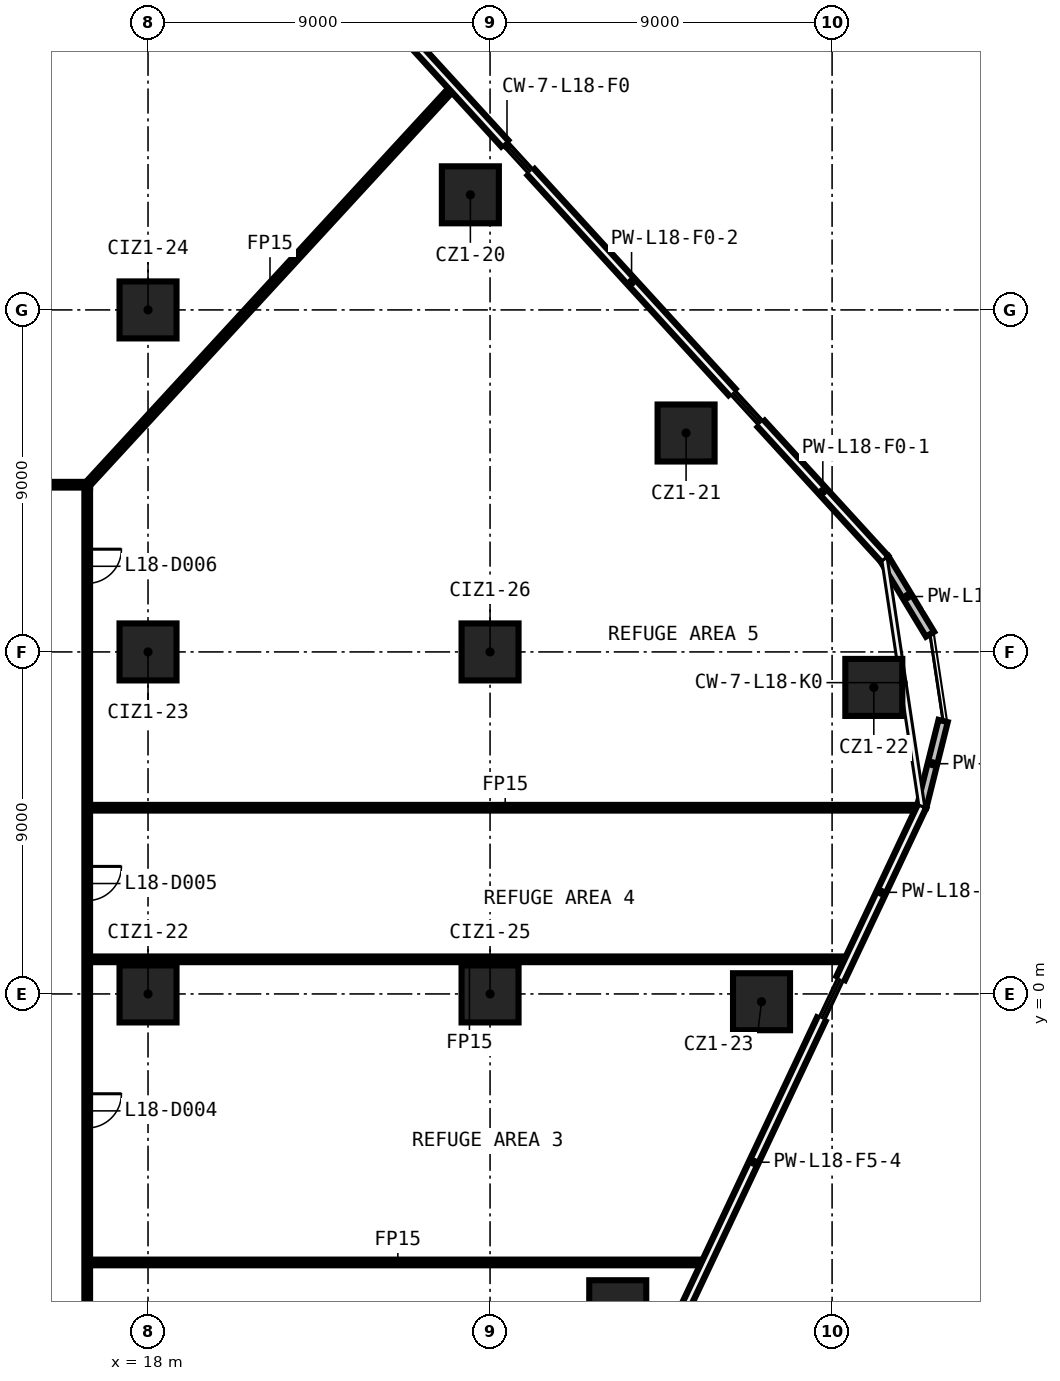
"""IFC4 building model, lengths in metres.
Left out: names, types, materials, properties, quantities, classifications, styles, units other than length and angle.
Written with IfcOpenShell. Run it as: python <this file> out.ifc"""

import sys

from ifc_helpers import new_model, si_unit, direction, frame, frame_2d, origin, origin_2d, place, context, subcontext, project, spatial, rectangle, extrude, element, fill, save


model = new_model("IFC4")
c1 = context("Model", 3, precision=1e-05, world=origin(), true_north=direction((0.0, 1.0)))
c2 = subcontext(c1, "Body", "Model", "MODEL_VIEW")
j1 = project(units=[si_unit("LENGTHUNIT", "METRE"), si_unit("PLANEANGLEUNIT", "RADIAN")], contexts=[c1])
p1 = place(None, origin())
s1 = spatial("IfcSite", under=j1, at=p1, CompositionType="ELEMENT")
p2 = place(p1, origin())
s2 = spatial("IfcBuilding", under=s1, at=p2, CompositionType="ELEMENT")
p3 = place(p2, frame((0.0, 0.0, 89.2)))
s3 = spatial("IfcBuildingStorey", under=s2, at=p3, CompositionType="ELEMENT", Elevation=89.2)
for number, where, z_axis, x_axis in (
    (1, (26.482, 21.029, 0.0), (0.0, 0.0, 1.0), (1.0, 0.0, 0.0)),
    (2, (32.158, 14.761, 0.0), (0.0, 0.0, 1.0), (1.0, 0.0, 0.0)),
    (3, (37.098, 8.066, 0.0), (0.0, 0.0, 1.0), (1.0, 0.0, 0.0)),
    (4, (34.143, -0.205, 0.0), (0.0, 0.0, 1.0), (1.0, 0.0, 0.0)),
    (5, (30.36, -8.284, 0.0), (0.0, 0.0, 1.0), (1.0, 0.0, 0.0)),
    (6, (18.0, 0.0, 0.0), (0.0, 0.0, 1.0), (1.0, 0.0, 0.0)),
    (7, (18.0, 9.0, 0.0), (0.0, 0.0, 1.0), (1.0, 0.0, 0.0)),
    (8, (18.0, 18.0, 0.0), (0.0, 0.0, 1.0), (1.0, 0.0, 0.0)),
    (9, (27.0, 0.0, 0.0), (0.0, 0.0, 1.0), (1.0, 0.0, 0.0)),
    (10, (27.0, 9.0, 0.0), (0.0, 0.0, 1.0), (1.0, 0.0, 0.0)),
):
    element("IfcColumn", number, at=place(p3, frame(where, z_axis=z_axis, x_axis=x_axis)), inside=s3, PredefinedType="COLUMN", context=c2, shape_type="SweptSolid", body=[
        extrude(rectangle(XDim=1.5, YDim=1.5, at=origin_2d()), origin(), (0.0, 0.0, 1.0), 5.55),
    ])
p4 = place(p3, frame((16.475, -7.066, 0.0), z_axis=(0.0, 0.0, 1.0), x_axis=(1.0, 0.0, 0.0)))
e11 = element("IfcWall", 11, at=p4, inside=s3, PredefinedType="PARTITIONING", context=c2, shape_type="SweptSolid", body=[
    extrude(rectangle(XDim=16.197, YDim=0.15, at=frame_2d((8.099, 0.0))), origin(), (0.0, 0.0, 1.0), 5.55),
])
p5 = place(p3, frame((16.475, 0.911, 0.0), z_axis=(0.0, 0.0, 1.0), x_axis=(1.0, 0.0, 0.0)))
e12 = element("IfcWall", 12, at=p5, inside=s3, PredefinedType="PARTITIONING", context=c2, shape_type="SweptSolid", body=[
    extrude(rectangle(XDim=19.964, YDim=0.15, at=frame_2d((9.982, 0.0))), origin(), (0.0, 0.0, 1.0), 5.55),
])
p6 = place(p3, frame((16.475, 4.9, 0.0), z_axis=(0.0, 0.0, 1.0), x_axis=(1.0, 0.0, 0.0)))
e13 = element("IfcWall", 13, at=p6, inside=s3, PredefinedType="PARTITIONING", context=c2, shape_type="SweptSolid", body=[
    extrude(rectangle(XDim=21.848, YDim=0.15, at=frame_2d((10.924, 0.0))), origin(), (0.0, 0.0, 1.0), 5.55),
])
p7 = place(p3, frame((-16.475, 13.4, 0.0), z_axis=(0.0, 0.0, 1.0), x_axis=(1.0, 0.0, 0.0)))
e14 = element("IfcWall", 14, at=p7, inside=s3, PredefinedType="PARTITIONING", context=c2, shape_type="SweptSolid", body=[
    extrude(rectangle(XDim=32.95, YDim=0.15, at=frame_2d((16.475, 0.0))), origin(), (0.0, 0.0, 1.0), 5.55),
])
p8 = place(p7, frame((28.958, 0.0, 0.0)))
e15 = element("IfcOpeningElement", 15, at=p8, cuts=e14, PredefinedType="OPENING", context=c2, shape_type="SweptSolid", body=[
    extrude(rectangle(XDim=0.9, YDim=2.1, at=frame_2d((0.45, 1.05))), frame((0.0, 0.085, 0.0), z_axis=(0.0, -1.0, 0.0), x_axis=(1.0, 0.0, 0.0)), (0.0, 0.0, 1.0), 0.17),
])
p9 = place(p3, frame((16.4, 13.4, 0.0), z_axis=(0.0, 0.0, 1.0), x_axis=(0.67725276206, 0.735750430705, 0.0)))
e16 = element("IfcWall", 16, at=p9, inside=s3, PredefinedType="PARTITIONING", context=c2, shape_type="SweptSolid", body=[
    extrude(rectangle(XDim=14.202, YDim=0.15, at=frame_2d((7.101, 0.0))), origin(), (0.0, 0.0, 1.0), 5.55),
])
p10 = place(p3, frame((16.4, 13.325, 0.0), z_axis=(0.0, 0.0, 1.0), x_axis=(0.0, -1.0, 0.0)))
e17 = element("IfcWall", 17, at=p10, inside=s3, PredefinedType="PARTITIONING", context=c2, shape_type="SweptSolid", body=[
    extrude(rectangle(XDim=26.65, YDim=0.15, at=frame_2d((13.325, 0.0))), origin(), (0.0, 0.0, 1.0), 5.55),
])
p11 = place(p10, frame((15.952, 0.0, 0.0)))
e18 = element("IfcOpeningElement", 18, at=p11, cuts=e17, PredefinedType="OPENING", context=c2, shape_type="SweptSolid", body=[
    extrude(rectangle(XDim=0.9, YDim=2.1, at=frame_2d((0.45, 1.05))), frame((0.0, 0.085, 0.0), z_axis=(0.0, -1.0, 0.0), x_axis=(1.0, 0.0, 0.0)), (0.0, 0.0, 1.0), 0.17),
])
p12 = place(p10, frame((9.969, 0.0, 0.0)))
e19 = element("IfcOpeningElement", 19, at=p12, cuts=e17, PredefinedType="OPENING", context=c2, shape_type="SweptSolid", body=[
    extrude(rectangle(XDim=0.9, YDim=2.1, at=frame_2d((0.45, 1.05))), frame((0.0, 0.085, 0.0), z_axis=(0.0, -1.0, 0.0), x_axis=(1.0, 0.0, 0.0)), (0.0, 0.0, 1.0), 0.17),
])
p13 = place(p10, frame((1.621, 0.0, 0.0)))
e20 = element("IfcOpeningElement", 20, at=p13, cuts=e17, PredefinedType="OPENING", context=c2, shape_type="SweptSolid", body=[
    extrude(rectangle(XDim=0.9, YDim=2.1, at=frame_2d((0.45, 1.05))), frame((0.0, 0.085, 0.0), z_axis=(0.0, -1.0, 0.0), x_axis=(1.0, 0.0, 0.0)), (0.0, 0.0, 1.0), 0.17),
])
for number, where, z_axis, x_axis in (
    (21, (38.361, 4.934, 0.0), (0.0, 0.0, 1.0), (0.242, 0.97, 0.0)),
    (22, (38.578, 9.466, 0.0), (0.0, 0.0, 1.0), (-0.517, 0.856, 0.0)),
):
    element("IfcWall", number, at=place(p3, frame(where, z_axis=z_axis, x_axis=x_axis)), inside=s3, PredefinedType="SOLIDWALL", context=c2, shape_type="SweptSolid", body=[
        extrude(rectangle(XDim=2.318, YDim=0.25, at=frame_2d((1.159, 0.0))), origin(), (0.0, 0.0, 1.0), 5.55),
    ])
p14 = place(p3, frame((37.379, 11.45, 0.0), z_axis=(0.0, 0.0, 1.0), x_axis=(-0.674620692961, 0.738164562024, 0.0)))
e23 = element("IfcWall", 23, at=p14, inside=s3, PredefinedType="SOLIDWALL", context=c2, shape_type="SweptSolid", body=[
    extrude(rectangle(XDim=4.81, YDim=0.25, at=frame_2d((2.405, 0.0))), origin(), (0.0, 0.0, 1.0), 5.55),
])
p15 = place(p3, frame((33.367, 15.839, 0.0), z_axis=(0.0, 0.0, 1.0), x_axis=(-0.674647495848, 0.738140065534, 0.0)))
e24 = element("IfcWall", 24, at=p15, inside=s3, PredefinedType="SOLIDWALL", context=c2, shape_type="SweptSolid", body=[
    extrude(rectangle(XDim=7.836, YDim=0.25, at=frame_2d((3.918, 0.0))), origin(), (0.0, 0.0, 1.0), 5.55),
])
p16 = place(p3, frame((27.385, 22.384, 0.0), z_axis=(0.0, 0.0, 1.0), x_axis=(-0.674651504882, 0.738136401324, 0.0)))
e25 = element("IfcWall", 25, at=p16, inside=s3, PredefinedType="SOLIDWALL", context=c2, shape_type="SweptSolid", body=[
    extrude(rectangle(XDim=7.845, YDim=0.25, at=frame_2d((3.923, 0.0))), origin(), (0.0, 0.0, 1.0), 5.55),
])
p17 = place(p3, frame((32.164, -8.189, 0.0), z_axis=(0.0, 0.0, 1.0), x_axis=(0.427023639186, 0.904240461147, 0.0)))
e26 = element("IfcWall", 26, at=p17, inside=s3, PredefinedType="SOLIDWALL", context=c2, shape_type="SweptSolid", body=[
    extrude(rectangle(XDim=8.317, YDim=0.25, at=frame_2d((4.159, 0.0))), origin(), (0.0, 0.0, 1.0), 5.55),
])
p18 = place(p3, frame((36.227, 0.415, 0.0), z_axis=(0.0, 0.0, 1.0), x_axis=(0.427034042555, 0.904235548128, 0.0)))
e27 = element("IfcWall", 27, at=p18, inside=s3, PredefinedType="SOLIDWALL", context=c2, shape_type="SweptSolid", body=[
    extrude(rectangle(XDim=4.998, YDim=0.25, at=frame_2d((2.499, 0.0))), origin(), (0.0, 0.0, 1.0), 5.55),
])
p19 = place(p11, origin())
e28 = element("IfcDoor", 28, at=p19, inside=s3, OperationType="SINGLE_SWING_LEFT", PredefinedType="DOOR", context=c2, shape_type="SweptSolid", body=[
    extrude(rectangle(XDim=0.9, YDim=2.1, at=frame_2d((0.45, 1.05))), frame((0.0, 0.025, 0.0), z_axis=(0.0, -1.0, 0.0), x_axis=(1.0, 0.0, 0.0)), (0.0, 0.0, 1.0), 0.05),
])
fill(e18, e28)
p20 = place(p12, origin())
e29 = element("IfcDoor", 29, at=p20, inside=s3, OperationType="SINGLE_SWING_RIGHT", PredefinedType="DOOR", context=c2, shape_type="SweptSolid", body=[
    extrude(rectangle(XDim=0.9, YDim=2.1, at=frame_2d((0.45, 1.05))), frame((0.0, 0.025, 0.0), z_axis=(0.0, -1.0, 0.0), x_axis=(1.0, 0.0, 0.0)), (0.0, 0.0, 1.0), 0.05),
])
fill(e19, e29)
p21 = place(p13, origin())
e30 = element("IfcDoor", 30, at=p21, inside=s3, OperationType="SINGLE_SWING_LEFT", PredefinedType="DOOR", context=c2, shape_type="SweptSolid", body=[
    extrude(rectangle(XDim=0.9, YDim=2.1, at=frame_2d((0.45, 1.05))), frame((0.0, 0.025, 0.0), z_axis=(0.0, -1.0, 0.0), x_axis=(1.0, 0.0, 0.0)), (0.0, 0.0, 1.0), 0.05),
])
fill(e20, e30)
save(model, sys.argv[1])
